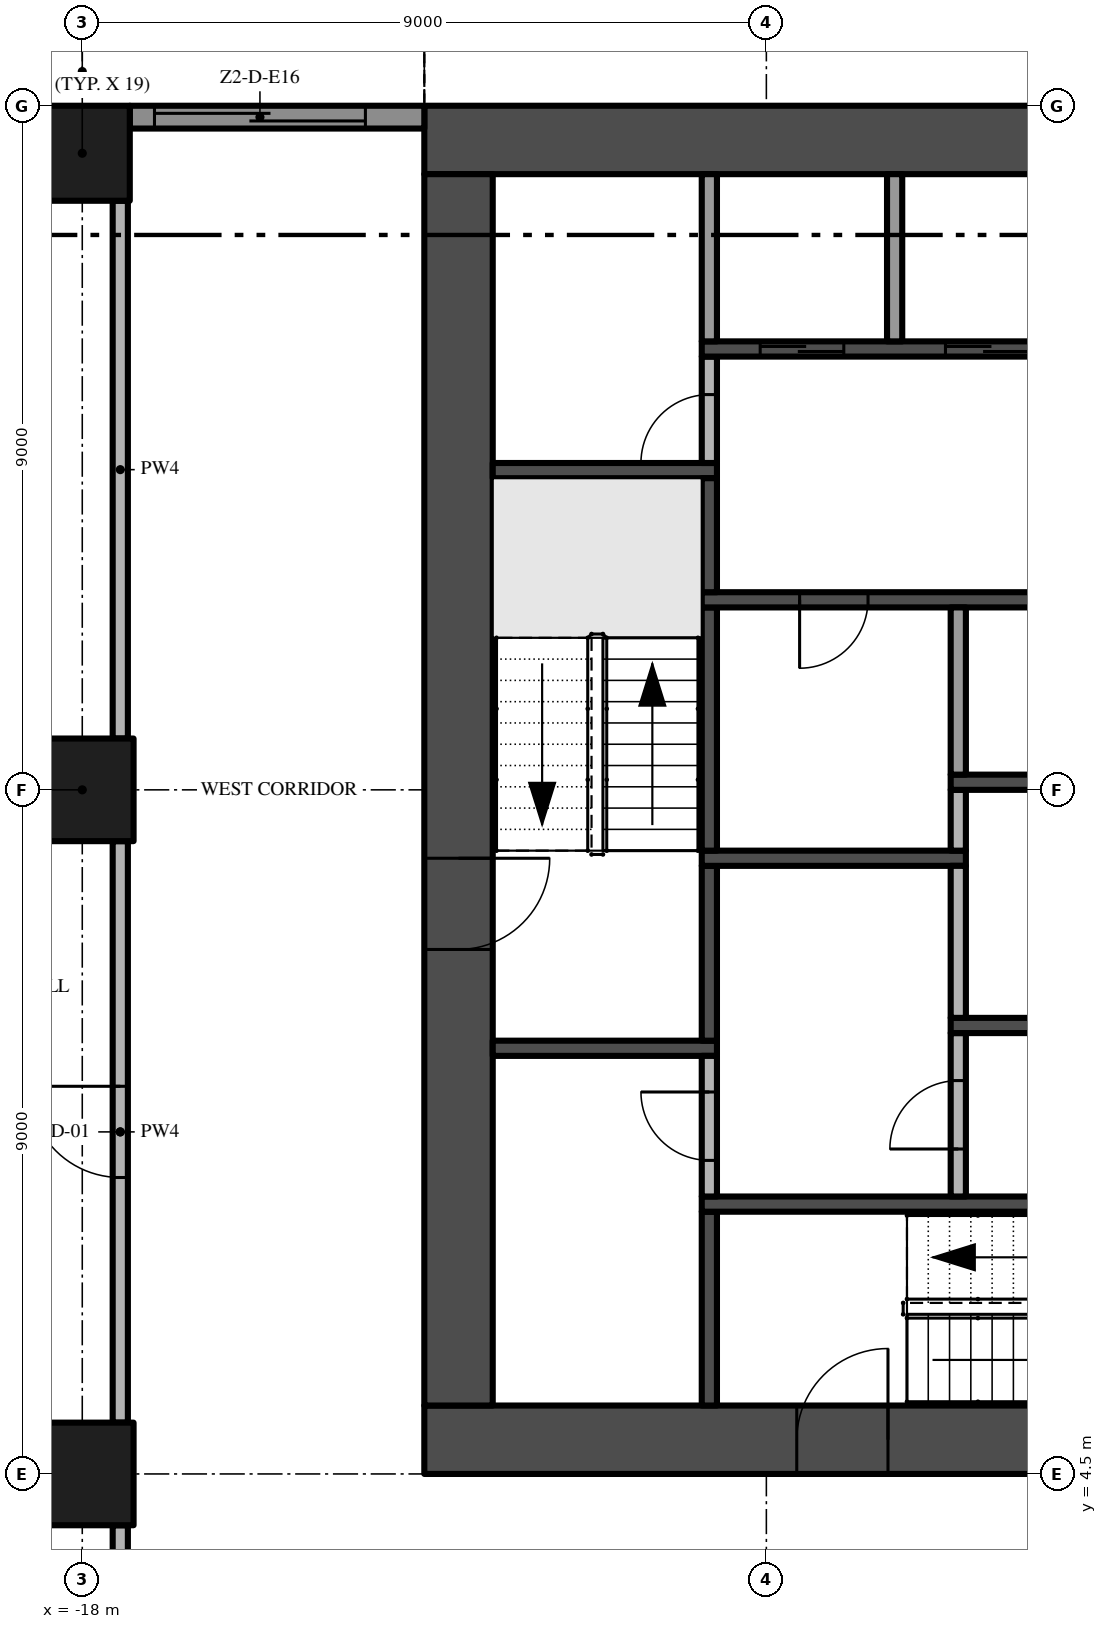
"""IFC4 building model, lengths in metres.
Left out: names, types, materials, properties, quantities, classifications, styles, units other than length and angle.
Written with IfcOpenShell. Run it as: python <this file> out.ifc"""

import sys

from ifc_helpers import new_model, si_unit, direction, frame, frame_2d, origin, origin_2d, place, context, subcontext, project, spatial, polyline, rectangle, outline, extrude, element, fill, save


model = new_model("IFC4")
c1 = context("Model", 3, precision=1e-05, world=origin(), true_north=direction((0.0, 1.0)))
c2 = subcontext(c1, "Body", "Model", "MODEL_VIEW")
j1 = project(units=[si_unit("LENGTHUNIT", "METRE"), si_unit("PLANEANGLEUNIT", "RADIAN")], contexts=[c1])
p1 = place(None, origin())
s1 = spatial("IfcSite", under=j1, at=p1, CompositionType="ELEMENT")
p2 = place(p1, origin())
s2 = spatial("IfcBuilding", under=s1, at=p2, CompositionType="ELEMENT")
p3 = place(p2, frame((0.0, 0.0, 111.2)))
s3 = spatial("IfcBuildingStorey", under=s2, at=p3, CompositionType="ELEMENT", Elevation=111.2)
p4 = place(p3, frame((-13.5, 4.95, -0.3), z_axis=(0.0, 0.0, 1.0), x_axis=(1.0, 0.0, 0.0)))
e1 = element("IfcWall", 1, at=p4, inside=s3, PredefinedType="SHEAR", context=c2, shape_type="SweptSolid", body=[
    extrude(rectangle(XDim=27.0, YDim=0.9, at=frame_2d((13.5, 0.0))), origin(), (0.0, 0.0, 1.0), 3.8),
])
p5 = place(p4, frame((12.0, 0.0, 0.3)))
e2 = element("IfcOpeningElement", 2, at=p5, cuts=e1, PredefinedType="OPENING", context=c2, shape_type="SweptSolid", body=[
    extrude(rectangle(XDim=3.0, YDim=2.4, at=frame_2d((1.5, 1.2))), frame((0.0, 0.46, 0.0), z_axis=(0.0, -1.0, 0.0), x_axis=(1.0, 0.0, 0.0)), (0.0, 0.0, 1.0), 0.92),
])
p6 = place(p4, frame((4.9, 0.0, 0.3)))
e3 = element("IfcOpeningElement", 3, at=p6, cuts=e1, PredefinedType="OPENING", context=c2, shape_type="SweptSolid", body=[
    extrude(rectangle(XDim=1.2, YDim=2.2, at=frame_2d((0.6, 1.1))), frame((0.0, 0.46, 0.0), z_axis=(0.0, -1.0, 0.0), x_axis=(1.0, 0.0, 0.0)), (0.0, 0.0, 1.0), 0.92),
])
p7 = place(p4, frame((20.75, 0.0, 0.3)))
e4 = element("IfcOpeningElement", 4, at=p7, cuts=e1, PredefinedType="OPENING", context=c2, shape_type="SweptSolid", body=[
    extrude(rectangle(XDim=1.5, YDim=2.2, at=frame_2d((0.75, 1.1))), frame((0.0, 0.46, 0.0), z_axis=(0.0, -1.0, 0.0), x_axis=(1.0, 0.0, 0.0)), (0.0, 0.0, 1.0), 0.92),
])
p8 = place(p4, frame((17.4, 0.0, 0.3)))
e5 = element("IfcOpeningElement", 5, at=p8, cuts=e1, PredefinedType="OPENING", context=c2, shape_type="SweptSolid", body=[
    extrude(rectangle(XDim=1.2, YDim=2.2, at=frame_2d((0.6, 1.1))), frame((0.0, 0.46, 0.0), z_axis=(0.0, -1.0, 0.0), x_axis=(1.0, 0.0, 0.0)), (0.0, 0.0, 1.0), 0.92),
])
p9 = place(p3, frame((13.5, 22.05, -0.3), z_axis=(0.0, 0.0, 1.0), x_axis=(-1.0, 0.0, 0.0)))
e6 = element("IfcWall", 6, at=p9, inside=s3, PredefinedType="SHEAR", context=c2, shape_type="SweptSolid", body=[
    extrude(rectangle(XDim=27.0, YDim=0.9, at=frame_2d((13.5, 0.0))), origin(), (0.0, 0.0, 1.0), 3.8),
])
p10 = place(p3, frame((-13.05, 21.6, -0.3), z_axis=(0.0, 0.0, 1.0), x_axis=(0.0, -1.0, 0.0)))
e7 = element("IfcWall", 7, at=p10, inside=s3, PredefinedType="SHEAR", context=c2, shape_type="SweptSolid", body=[
    extrude(rectangle(XDim=16.2, YDim=0.9, at=frame_2d((8.1, 0.0))), origin(), (0.0, 0.0, 1.0), 3.8),
])
p11 = place(p10, frame((9.0, 0.0, 0.3)))
e8 = element("IfcOpeningElement", 8, at=p11, cuts=e7, PredefinedType="OPENING", context=c2, shape_type="SweptSolid", body=[
    extrude(rectangle(XDim=1.2, YDim=2.2, at=frame_2d((0.6, 1.1))), frame((0.0, 0.46, 0.0), z_axis=(0.0, -1.0, 0.0), x_axis=(1.0, 0.0, 0.0)), (0.0, 0.0, 1.0), 0.92),
])
p12 = place(p3, frame((-18.0, 13.5, 0.0), z_axis=(0.0, 0.0, 1.0), x_axis=(1.0, 0.0, 0.0)))
e9 = element("IfcColumn", 9, at=p12, inside=s3, PredefinedType="COLUMN", context=c2, shape_type="SweptSolid", body=[
    extrude(rectangle(XDim=1.35, YDim=1.35, at=origin_2d()), origin(), (0.0, 0.0, 1.0), 3.5),
])
p13 = place(p3, frame((-18.0, 21.875, 0.0), z_axis=(0.0, 0.0, 1.0), x_axis=(1.0, 0.0, 0.0)))
e10 = element("IfcColumn", 10, at=p13, inside=s3, PredefinedType="COLUMN", context=c2, shape_type="SweptSolid", body=[
    extrude(rectangle(XDim=1.25, YDim=1.25, at=origin_2d()), origin(), (0.0, 0.0, 1.0), 3.5),
])
p14 = place(p3, frame((-18.0, 4.5, 0.0), z_axis=(0.0, 0.0, 1.0), x_axis=(1.0, 0.0, 0.0)))
e11 = element("IfcColumn", 11, at=p14, inside=s3, PredefinedType="COLUMN", context=c2, shape_type="SweptSolid", body=[
    extrude(rectangle(XDim=1.35, YDim=1.35, at=origin_2d()), origin(), (0.0, 0.0, 1.0), 3.5),
])
p15 = place(p3, frame((-17.375, 22.35, 0.0), z_axis=(0.0, 0.0, 1.0), x_axis=(1.0, 0.0, 0.0)))
e12 = element("IfcWall", 12, at=p15, inside=s3, PredefinedType="SOLIDWALL", context=c2, shape_type="SweptSolid", body=[
    extrude(rectangle(XDim=3.875, YDim=0.3, at=frame_2d((1.938, 0.0))), origin(), (0.0, 0.0, 1.0), 3.5),
])
p16 = place(p15, frame((0.325, 0.0, 0.0)))
e13 = element("IfcOpeningElement", 13, at=p16, cuts=e12, PredefinedType="OPENING", context=c2, shape_type="SweptSolid", body=[
    extrude(rectangle(XDim=2.775, YDim=2.4, at=frame_2d((1.387, 1.2))), frame((0.0, 0.16, 0.0), z_axis=(0.0, -1.0, 0.0), x_axis=(1.0, 0.0, 0.0)), (0.0, 0.0, 1.0), 0.32),
])
p17 = place(p3, origin())
e14 = element("IfcWall", 14, at=p17, inside=s3, PredefinedType="USERDEFINED", context=c2, shape_type="SweptSolid", body=[
    extrude(outline(polyline([(-13.5, 25.149), (-15.0, 25.485), (-15.375, 25.5), (-16.5, 25.369), (-18.0, 24.845), (-19.5, 24.112), (-21.0, 23.451), (-22.5, 23.115), (-22.445, 22.871), (-20.921, 23.213), (-19.395, 23.885), (-17.904, 24.614), (-16.444, 25.124), (-15.365, 25.249), (-15.033, 25.236), (-13.555, 24.905), (-13.5, 25.149)])), origin(), (0.0, 0.0, 1.0), 0.9),
])
for number, where, z_axis, x_axis in (
    (15, (-12.6, 10.1, 0.0), (0.0, 0.0, 1.0), (1.0, 0.0, 0.0)),
    (16, (-12.6, 17.7, 0.0), (0.0, 0.0, 1.0), (1.0, 0.0, 0.0)),
):
    element("IfcWall", number, at=place(p3, frame(where, z_axis=z_axis, x_axis=x_axis)), inside=s3, PredefinedType="SHEAR", context=c2, shape_type="SweptSolid", body=[
        extrude(rectangle(XDim=2.95, YDim=0.2, at=frame_2d((1.475, 0.0))), origin(), (0.0, 0.0, 1.0), 3.5),
    ])
p18 = place(p3, frame((-9.75, 5.4, 0.0), z_axis=(0.0, 0.0, 1.0), x_axis=(0.0, 1.0, 0.0)))
e17 = element("IfcWall", 17, at=p18, inside=s3, PredefinedType="SHEAR", context=c2, shape_type="SweptSolid", body=[
    extrude(rectangle(XDim=2.55, YDim=0.2, at=frame_2d((1.275, 0.0))), origin(), (0.0, 0.0, 1.0), 3.5),
])
p19 = place(p3, frame((-9.85, 8.05, 0.0), z_axis=(0.0, 0.0, 1.0), x_axis=(1.0, 0.0, 0.0)))
e18 = element("IfcWall", 18, at=p19, inside=s3, PredefinedType="SHEAR", context=c2, shape_type="SweptSolid", body=[
    extrude(rectangle(XDim=8.35, YDim=0.2, at=frame_2d((4.175, 0.0))), origin(), (0.0, 0.0, 1.0), 3.5),
])
p20 = place(p3, frame((-9.75, 8.15, 0.0), z_axis=(0.0, 0.0, 1.0), x_axis=(0.0, 1.0, 0.0)))
e19 = element("IfcWall", 19, at=p20, inside=s3, PredefinedType="PARTITIONING", context=c2, shape_type="SweptSolid", body=[
    extrude(rectangle(XDim=1.85, YDim=0.2, at=frame_2d((0.925, 0.0))), origin(), (0.0, 0.0, 1.0), 3.5),
])
p21 = place(p20, frame((0.475, 0.0, 0.0)))
e20 = element("IfcOpeningElement", 20, at=p21, cuts=e19, PredefinedType="OPENING", context=c2, shape_type="SweptSolid", body=[
    extrude(rectangle(XDim=0.9, YDim=2.1, at=frame_2d((0.45, 1.05))), frame((0.0, 0.11, 0.0), z_axis=(0.0, -1.0, 0.0), x_axis=(1.0, 0.0, 0.0)), (0.0, 0.0, 1.0), 0.22),
])
p22 = place(p3, frame((-9.75, 10.2, 0.0), z_axis=(0.0, 0.0, 1.0), x_axis=(0.0, 1.0, 0.0)))
e21 = element("IfcWall", 21, at=p22, inside=s3, PredefinedType="SHEAR", context=c2, shape_type="SweptSolid", body=[
    extrude(rectangle(XDim=2.3, YDim=0.2, at=frame_2d((1.15, 0.0))), origin(), (0.0, 0.0, 1.0), 3.5),
])
p23 = place(p3, frame((-9.85, 12.6, 0.0), z_axis=(0.0, 0.0, 1.0), x_axis=(1.0, 0.0, 0.0)))
e22 = element("IfcWall", 22, at=p23, inside=s3, PredefinedType="SHEAR", context=c2, shape_type="SweptSolid", body=[
    extrude(rectangle(XDim=3.475, YDim=0.2, at=frame_2d((1.738, 0.0))), origin(), (0.0, 0.0, 1.0), 3.5),
])
p24 = place(p3, frame((-9.75, 12.7, 0.0), z_axis=(0.0, 0.0, 1.0), x_axis=(0.0, 1.0, 0.0)))
e23 = element("IfcWall", 23, at=p24, inside=s3, PredefinedType="SHEAR", context=c2, shape_type="SweptSolid", body=[
    extrude(rectangle(XDim=3.2, YDim=0.2, at=frame_2d((1.6, 0.0))), origin(), (0.0, 0.0, 1.0), 3.5),
])
p25 = place(p3, frame((-1.5, 16.0, 0.0), z_axis=(0.0, 0.0, 1.0), x_axis=(-1.0, 0.0, 0.0)))
e24 = element("IfcWall", 24, at=p25, inside=s3, PredefinedType="SHEAR", context=c2, shape_type="SweptSolid", body=[
    extrude(rectangle(XDim=8.35, YDim=0.2, at=frame_2d((4.175, 0.0))), origin(), (0.0, 0.0, 1.0), 3.5),
])
p26 = place(p25, frame((6.162, 0.0, 0.0)))
e25 = element("IfcOpeningElement", 25, at=p26, cuts=e24, PredefinedType="OPENING", context=c2, shape_type="SweptSolid", body=[
    extrude(rectangle(XDim=0.9, YDim=2.1, at=frame_2d((0.45, 1.05))), frame((0.0, 0.11, 0.0), z_axis=(0.0, -1.0, 0.0), x_axis=(1.0, 0.0, 0.0)), (0.0, 0.0, 1.0), 0.22),
])
p27 = place(p3, frame((-9.75, 16.1, 0.0), z_axis=(0.0, 0.0, 1.0), x_axis=(0.0, 1.0, 0.0)))
e26 = element("IfcWall", 26, at=p27, inside=s3, PredefinedType="SHEAR", context=c2, shape_type="SweptSolid", body=[
    extrude(rectangle(XDim=1.5, YDim=0.2, at=frame_2d((0.75, 0.0))), origin(), (0.0, 0.0, 1.0), 3.5),
])
p28 = place(p3, frame((-9.75, 17.8, 0.0), z_axis=(0.0, 0.0, 1.0), x_axis=(0.0, 1.0, 0.0)))
e27 = element("IfcWall", 27, at=p28, inside=s3, PredefinedType="PARTITIONING", context=c2, shape_type="SweptSolid", body=[
    extrude(rectangle(XDim=1.4, YDim=0.2, at=frame_2d((0.7, 0.0))), origin(), (0.0, 0.0, 1.0), 3.5),
])
p29 = place(p28, origin())
e28 = element("IfcOpeningElement", 28, at=p29, cuts=e27, PredefinedType="OPENING", context=c2, shape_type="SweptSolid", body=[
    extrude(rectangle(XDim=0.9, YDim=2.1, at=frame_2d((0.45, 1.05))), frame((0.0, 0.11, 0.0), z_axis=(0.0, -1.0, 0.0), x_axis=(1.0, 0.0, 0.0)), (0.0, 0.0, 1.0), 0.22),
])
p30 = place(p3, frame((-9.85, 19.3, 0.0), z_axis=(0.0, 0.0, 1.0), x_axis=(1.0, 0.0, 0.0)))
e29 = element("IfcWall", 29, at=p30, inside=s3, PredefinedType="SHEAR", context=c2, shape_type="SweptSolid", body=[
    extrude(rectangle(XDim=19.7, YDim=0.2, at=frame_2d((9.85, 0.0))), origin(), (0.0, 0.0, 1.0), 3.5),
])
p31 = place(p30, frame((0.769, 0.0, 0.0)))
e30 = element("IfcOpeningElement", 30, at=p31, cuts=e29, PredefinedType="OPENING", context=c2, shape_type="SweptSolid", body=[
    extrude(rectangle(XDim=1.1, YDim=2.1, at=frame_2d((0.55, 1.05))), frame((0.0, 0.11, 0.0), z_axis=(0.0, -1.0, 0.0), x_axis=(1.0, 0.0, 0.0)), (0.0, 0.0, 1.0), 0.22),
])
p32 = place(p30, frame((3.206, 0.0, 0.0)))
e31 = element("IfcOpeningElement", 31, at=p32, cuts=e29, PredefinedType="OPENING", context=c2, shape_type="SweptSolid", body=[
    extrude(rectangle(XDim=1.1, YDim=2.1, at=frame_2d((0.55, 1.05))), frame((0.0, 0.11, 0.0), z_axis=(0.0, -1.0, 0.0), x_axis=(1.0, 0.0, 0.0)), (0.0, 0.0, 1.0), 0.22),
])
p33 = place(p30, frame((5.644, 0.0, 0.0)))
e32 = element("IfcOpeningElement", 32, at=p33, cuts=e29, PredefinedType="OPENING", context=c2, shape_type="SweptSolid", body=[
    extrude(rectangle(XDim=1.1, YDim=2.1, at=frame_2d((0.55, 1.05))), frame((0.0, 0.11, 0.0), z_axis=(0.0, -1.0, 0.0), x_axis=(1.0, 0.0, 0.0)), (0.0, 0.0, 1.0), 0.22),
])
p34 = place(p30, frame((8.081, 0.0, 0.0)))
e33 = element("IfcOpeningElement", 33, at=p34, cuts=e29, PredefinedType="OPENING", context=c2, shape_type="SweptSolid", body=[
    extrude(rectangle(XDim=1.1, YDim=2.1, at=frame_2d((0.55, 1.05))), frame((0.0, 0.11, 0.0), z_axis=(0.0, -1.0, 0.0), x_axis=(1.0, 0.0, 0.0)), (0.0, 0.0, 1.0), 0.22),
])
for number, where, z_axis, x_axis in (
    (34, (-9.75, 19.4, 0.0), (0.0, 0.0, 1.0), (0.0, 1.0, 0.0)),
    (35, (-7.312, 19.4, 0.0), (0.0, 0.0, 1.0), (0.0, 1.0, 0.0)),
):
    element("IfcWall", number, at=place(p3, frame(where, z_axis=z_axis, x_axis=x_axis)), inside=s3, PredefinedType="PARTITIONING", context=c2, shape_type="SweptSolid", body=[
        extrude(rectangle(XDim=2.2, YDim=0.2, at=frame_2d((1.1, 0.0))), origin(), (0.0, 0.0, 1.0), 3.5),
    ])
p35 = place(p3, frame((-6.475, 8.15, 0.0), z_axis=(0.0, 0.0, 1.0), x_axis=(0.0, 1.0, 0.0)))
e36 = element("IfcWall", 36, at=p35, inside=s3, PredefinedType="PARTITIONING", context=c2, shape_type="SweptSolid", body=[
    extrude(rectangle(XDim=2.15, YDim=0.2, at=frame_2d((1.075, 0.0))), origin(), (0.0, 0.0, 1.0), 3.5),
])
p36 = place(p35, frame((0.625, 0.0, 0.0)))
e37 = element("IfcOpeningElement", 37, at=p36, cuts=e36, PredefinedType="OPENING", context=c2, shape_type="SweptSolid", body=[
    extrude(rectangle(XDim=0.9, YDim=2.1, at=frame_2d((0.45, 1.05))), frame((0.0, 0.11, 0.0), z_axis=(0.0, -1.0, 0.0), x_axis=(1.0, 0.0, 0.0)), (0.0, 0.0, 1.0), 0.22),
])
p37 = place(p3, frame((-6.575, 10.4, 0.0), z_axis=(0.0, 0.0, 1.0), x_axis=(1.0, 0.0, 0.0)))
e38 = element("IfcWall", 38, at=p37, inside=s3, PredefinedType="SHEAR", context=c2, shape_type="SweptSolid", body=[
    extrude(rectangle(XDim=5.075, YDim=0.2, at=frame_2d((2.538, 0.0))), origin(), (0.0, 0.0, 1.0), 3.5),
])
p38 = place(p3, frame((-6.475, 10.5, 0.0), z_axis=(0.0, 0.0, 1.0), x_axis=(0.0, 1.0, 0.0)))
e39 = element("IfcWall", 39, at=p38, inside=s3, PredefinedType="PARTITIONING", context=c2, shape_type="SweptSolid", body=[
    extrude(rectangle(XDim=2.0, YDim=0.2, at=frame_2d((1.0, 0.0))), origin(), (0.0, 0.0, 1.0), 3.5),
])
p39 = place(p3, frame((-6.475, 12.7, 0.0), z_axis=(0.0, 0.0, 1.0), x_axis=(0.0, 1.0, 0.0)))
e40 = element("IfcWall", 40, at=p39, inside=s3, PredefinedType="PARTITIONING", context=c2, shape_type="SweptSolid", body=[
    extrude(rectangle(XDim=0.8, YDim=0.2, at=frame_2d((0.4, 0.0))), origin(), (0.0, 0.0, 1.0), 3.5),
])
p40 = place(p3, frame((-6.575, 13.6, 0.0), z_axis=(0.0, 0.0, 1.0), x_axis=(1.0, 0.0, 0.0)))
e41 = element("IfcWall", 41, at=p40, inside=s3, PredefinedType="SHEAR", context=c2, shape_type="SweptSolid", body=[
    extrude(rectangle(XDim=5.075, YDim=0.2, at=frame_2d((2.538, 0.0))), origin(), (0.0, 0.0, 1.0), 3.5),
])
p41 = place(p3, frame((-6.475, 13.7, 0.0), z_axis=(0.0, 0.0, 1.0), x_axis=(0.0, 1.0, 0.0)))
e42 = element("IfcWall", 42, at=p41, inside=s3, PredefinedType="PARTITIONING", context=c2, shape_type="SweptSolid", body=[
    extrude(rectangle(XDim=2.2, YDim=0.2, at=frame_2d((1.1, 0.0))), origin(), (0.0, 0.0, 1.0), 3.5),
])
p42 = place(p3, frame((-17.5, -0.2, 0.0), z_axis=(0.0, 0.0, 1.0), x_axis=(0.0, 1.0, 0.0)))
e43 = element("IfcWall", 43, at=p42, inside=s3, PredefinedType="PARTITIONING", context=c2, shape_type="SweptSolid", body=[
    extrude(rectangle(XDim=4.025, YDim=0.2, at=frame_2d((2.013, 0.0))), origin(), (0.0, 0.0, 1.0), 3.5),
])
p43 = place(p3, frame((-17.5, 5.175, 0.0), z_axis=(0.0, 0.0, 1.0), x_axis=(0.0, 1.0, 0.0)))
e44 = element("IfcWall", 44, at=p43, inside=s3, PredefinedType="PARTITIONING", context=c2, shape_type="SweptSolid", body=[
    extrude(rectangle(XDim=7.65, YDim=0.2, at=frame_2d((3.825, 0.0))), origin(), (0.0, 0.0, 1.0), 3.5),
])
p44 = place(p43, frame((3.225, 0.0, 0.0)))
e45 = element("IfcOpeningElement", 45, at=p44, cuts=e44, PredefinedType="OPENING", context=c2, shape_type="SweptSolid", body=[
    extrude(rectangle(XDim=1.2, YDim=2.4, at=frame_2d((0.6, 1.2))), frame((0.0, 0.11, 0.0), z_axis=(0.0, -1.0, 0.0), x_axis=(1.0, 0.0, 0.0)), (0.0, 0.0, 1.0), 0.22),
])
p45 = place(p3, frame((-17.5, 14.175, 0.0), z_axis=(0.0, 0.0, 1.0), x_axis=(0.0, 1.0, 0.0)))
e46 = element("IfcWall", 46, at=p45, inside=s3, PredefinedType="PARTITIONING", context=c2, shape_type="SweptSolid", body=[
    extrude(rectangle(XDim=7.075, YDim=0.2, at=frame_2d((3.538, 0.0))), origin(), (0.0, 0.0, 1.0), 3.5),
])
p46 = place(p16, origin())
e47 = element("IfcDoor", 47, at=p46, inside=s3, OperationType="SINGLE_SWING_LEFT", PredefinedType="DOOR", context=c2, shape_type="SweptSolid", body=[
    extrude(rectangle(XDim=2.775, YDim=2.4, at=frame_2d((1.387, 1.2))), frame((0.0, 0.025, 0.0), z_axis=(0.0, -1.0, 0.0), x_axis=(1.0, 0.0, 0.0)), (0.0, 0.0, 1.0), 0.05),
])
fill(e13, e47)
p47 = place(p11, frame((1.2, 0.0, 0.0), z_axis=(0.0, 0.0, 1.0), x_axis=(-1.0, 0.0, 0.0)))
e48 = element("IfcDoor", 48, at=p47, inside=s3, OperationType="SINGLE_SWING_RIGHT", PredefinedType="DOOR", context=c2, shape_type="SweptSolid", body=[
    extrude(rectangle(XDim=1.2, YDim=2.2, at=frame_2d((0.6, 1.1))), frame((0.0, 0.025, 0.0), z_axis=(0.0, -1.0, 0.0), x_axis=(1.0, 0.0, 0.0)), (0.0, 0.0, 1.0), 0.05),
])
fill(e8, e48)
p48 = place(p6, frame((1.2, 0.0, 0.0), z_axis=(0.0, 0.0, 1.0), x_axis=(-1.0, 0.0, 0.0)))
e49 = element("IfcDoor", 49, at=p48, inside=s3, OperationType="SINGLE_SWING_LEFT", PredefinedType="DOOR", context=c2, shape_type="SweptSolid", body=[
    extrude(rectangle(XDim=1.2, YDim=2.2, at=frame_2d((0.6, 1.1))), frame((0.0, 0.025, 0.0), z_axis=(0.0, -1.0, 0.0), x_axis=(1.0, 0.0, 0.0)), (0.0, 0.0, 1.0), 0.05),
])
fill(e3, e49)
p49 = place(p31, origin())
e50 = element("IfcDoor", 50, at=p49, inside=s3, OperationType="SLIDING_TO_LEFT", PredefinedType="DOOR", context=c2, shape_type="SweptSolid", body=[
    extrude(rectangle(XDim=1.1, YDim=2.1, at=frame_2d((0.55, 1.05))), frame((0.0, 0.025, 0.0), z_axis=(0.0, -1.0, 0.0), x_axis=(1.0, 0.0, 0.0)), (0.0, 0.0, 1.0), 0.05),
])
fill(e30, e50)
p50 = place(p32, origin())
e51 = element("IfcDoor", 51, at=p50, inside=s3, OperationType="SLIDING_TO_LEFT", PredefinedType="DOOR", context=c2, shape_type="SweptSolid", body=[
    extrude(rectangle(XDim=1.1, YDim=2.1, at=frame_2d((0.55, 1.05))), frame((0.0, 0.025, 0.0), z_axis=(0.0, -1.0, 0.0), x_axis=(1.0, 0.0, 0.0)), (0.0, 0.0, 1.0), 0.05),
])
fill(e31, e51)
p51 = place(p26, origin())
e52 = element("IfcDoor", 52, at=p51, inside=s3, OperationType="SINGLE_SWING_RIGHT", PredefinedType="DOOR", context=c2, shape_type="SweptSolid", body=[
    extrude(rectangle(XDim=0.9, YDim=2.1, at=frame_2d((0.45, 1.05))), frame((0.0, 0.025, 0.0), z_axis=(0.0, -1.0, 0.0), x_axis=(1.0, 0.0, 0.0)), (0.0, 0.0, 1.0), 0.05),
])
fill(e25, e52)
p52 = place(p29, origin())
e53 = element("IfcDoor", 53, at=p52, inside=s3, OperationType="SINGLE_SWING_LEFT", PredefinedType="DOOR", context=c2, shape_type="SweptSolid", body=[
    extrude(rectangle(XDim=0.9, YDim=2.1, at=frame_2d((0.45, 1.05))), frame((0.0, 0.025, 0.0), z_axis=(0.0, -1.0, 0.0), x_axis=(1.0, 0.0, 0.0)), (0.0, 0.0, 1.0), 0.05),
])
fill(e28, e53)
p53 = place(p36, origin())
e54 = element("IfcDoor", 54, at=p53, inside=s3, OperationType="SINGLE_SWING_LEFT", PredefinedType="DOOR", context=c2, shape_type="SweptSolid", body=[
    extrude(rectangle(XDim=0.9, YDim=2.1, at=frame_2d((0.45, 1.05))), frame((0.0, 0.025, 0.0), z_axis=(0.0, -1.0, 0.0), x_axis=(1.0, 0.0, 0.0)), (0.0, 0.0, 1.0), 0.05),
])
fill(e37, e54)
p54 = place(p21, origin())
e55 = element("IfcDoor", 55, at=p54, inside=s3, OperationType="SINGLE_SWING_RIGHT", PredefinedType="DOOR", context=c2, shape_type="SweptSolid", body=[
    extrude(rectangle(XDim=0.9, YDim=2.1, at=frame_2d((0.45, 1.05))), frame((0.0, 0.025, 0.0), z_axis=(0.0, -1.0, 0.0), x_axis=(1.0, 0.0, 0.0)), (0.0, 0.0, 1.0), 0.05),
])
fill(e20, e55)
p55 = place(p44, origin())
e56 = element("IfcDoor", 56, at=p55, inside=s3, OperationType="SINGLE_SWING_RIGHT", PredefinedType="DOOR", context=c2, shape_type="SweptSolid", body=[
    extrude(rectangle(XDim=1.2, YDim=2.4, at=frame_2d((0.6, 1.2))), frame((0.0, 0.025, 0.0), z_axis=(0.0, -1.0, 0.0), x_axis=(1.0, 0.0, 0.0)), (0.0, 0.0, 1.0), 0.05),
])
fill(e45, e56)
save(model, sys.argv[1])
